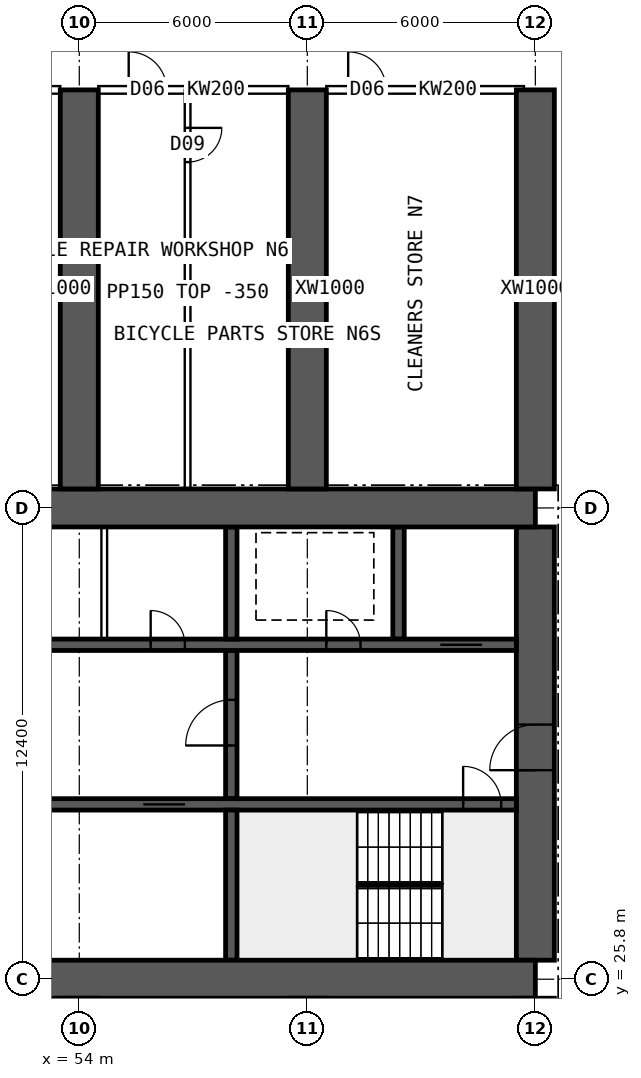
"""IFC4 building model, lengths in metres.
Left out: names, types, materials, properties, quantities, classifications, styles, units other than length and angle.
Written with IfcOpenShell. Run it as: python <this file> out.ifc"""

import sys

from ifc_helpers import new_model, si_unit, direction, frame, frame_2d, origin, place, context, subcontext, project, spatial, rectangle, extrude, element, fill, save


model = new_model("IFC4")
c1 = context("Model", 3, precision=1e-05, world=origin(), true_north=direction((0.0, 1.0)))
c2 = subcontext(c1, "Body", "Model", "MODEL_VIEW")
j1 = project(units=[si_unit("LENGTHUNIT", "METRE"), si_unit("PLANEANGLEUNIT", "RADIAN")], contexts=[c1])
p1 = place(None, origin())
s1 = spatial("IfcSite", under=j1, at=p1, CompositionType="ELEMENT")
p2 = place(p1, origin())
s2 = spatial("IfcBuilding", under=s1, at=p2, CompositionType="ELEMENT")
p3 = place(p2, origin())
s3 = spatial("IfcBuildingStorey", under=s2, at=p3, CompositionType="ELEMENT", Elevation=0.0)
for number, where, z_axis, x_axis in (
    (1, (18.0, 25.8, 0.0), (0.0, 0.0, 1.0), (1.0, 0.0, 0.0)),
    (2, (18.0, 38.2, 0.0), (0.0, 0.0, 1.0), (1.0, 0.0, 0.0)),
):
    element("IfcWall", number, at=place(p3, frame(where, z_axis=z_axis, x_axis=x_axis)), inside=s3, PredefinedType="SHEAR", context=c2, shape_type="SweptSolid", body=[
        extrude(rectangle(XDim=48.0, YDim=1.0, at=frame_2d((24.0, 0.0))), origin(), (0.0, 0.0, 1.0), 6.0),
    ])
p4 = place(p3, frame((66.0, 26.3, 0.0), z_axis=(0.0, 0.0, 1.0), x_axis=(0.0, 1.0, 0.0)))
e3 = element("IfcWall", 3, at=p4, inside=s3, PredefinedType="SHEAR", context=c2, shape_type="SweptSolid", body=[
    extrude(rectangle(XDim=11.4, YDim=1.0, at=frame_2d((5.7, 0.0))), origin(), (0.0, 0.0, 1.0), 6.0),
])
p5 = place(p4, frame((5.0, 0.0, 0.0)))
e4 = element("IfcOpeningElement", 4, at=p5, cuts=e3, PredefinedType="OPENING", context=c2, shape_type="SweptSolid", body=[
    extrude(rectangle(XDim=1.2, YDim=2.1, at=frame_2d((0.6, 1.05))), frame((0.0, 0.51, 0.0), z_axis=(0.0, -1.0, 0.0), x_axis=(1.0, 0.0, 0.0)), (0.0, 0.0, 1.0), 1.02),
])
p6 = place(p3, frame((18.5, 30.4, 0.0), z_axis=(0.0, 0.0, 1.0), x_axis=(1.0, 0.0, 0.0)))
e5 = element("IfcWall", 5, at=p6, inside=s3, PredefinedType="SHEAR", context=c2, shape_type="SweptSolid", body=[
    extrude(rectangle(XDim=47.0, YDim=0.3, at=frame_2d((23.5, 0.0))), origin(), (0.0, 0.0, 1.0), 6.0),
])
p7 = place(p6, frame((0.4, 0.0, 0.0)))
e6 = element("IfcOpeningElement", 6, at=p7, cuts=e5, PredefinedType="OPENING", context=c2, shape_type="SweptSolid", body=[
    extrude(rectangle(XDim=1.0, YDim=2.1, at=frame_2d((0.5, 1.05))), frame((0.0, 0.16, 0.0), z_axis=(0.0, -1.0, 0.0), x_axis=(1.0, 0.0, 0.0)), (0.0, 0.0, 1.0), 0.32),
])
p8 = place(p6, frame((45.6, 0.0, 0.0)))
e7 = element("IfcOpeningElement", 7, at=p8, cuts=e5, PredefinedType="OPENING", context=c2, shape_type="SweptSolid", body=[
    extrude(rectangle(XDim=1.0, YDim=2.1, at=frame_2d((0.5, 1.05))), frame((0.0, 0.16, 0.0), z_axis=(0.0, -1.0, 0.0), x_axis=(1.0, 0.0, 0.0)), (0.0, 0.0, 1.0), 0.32),
])
p9 = place(p6, frame((8.25, 0.0, 0.0)))
e8 = element("IfcOpeningElement", 8, at=p9, cuts=e5, PredefinedType="OPENING", context=c2, shape_type="SweptSolid", body=[
    extrude(rectangle(XDim=1.1, YDim=2.1, at=frame_2d((0.55, 1.05))), frame((0.0, 0.16, 0.0), z_axis=(0.0, -1.0, 0.0), x_axis=(1.0, 0.0, 0.0)), (0.0, 0.0, 1.0), 0.32),
])
p10 = place(p6, frame((10.85, 0.0, 0.0)))
e9 = element("IfcOpeningElement", 9, at=p10, cuts=e5, PredefinedType="OPENING", context=c2, shape_type="SweptSolid", body=[
    extrude(rectangle(XDim=1.1, YDim=2.1, at=frame_2d((0.55, 1.05))), frame((0.0, 0.16, 0.0), z_axis=(0.0, -1.0, 0.0), x_axis=(1.0, 0.0, 0.0)), (0.0, 0.0, 1.0), 0.32),
])
p11 = place(p6, frame((13.45, 0.0, 0.0)))
e10 = element("IfcOpeningElement", 10, at=p11, cuts=e5, PredefinedType="OPENING", context=c2, shape_type="SweptSolid", body=[
    extrude(rectangle(XDim=1.1, YDim=2.1, at=frame_2d((0.55, 1.05))), frame((0.0, 0.16, 0.0), z_axis=(0.0, -1.0, 0.0), x_axis=(1.0, 0.0, 0.0)), (0.0, 0.0, 1.0), 0.32),
])
p12 = place(p6, frame((16.05, 0.0, 0.0)))
e11 = element("IfcOpeningElement", 11, at=p12, cuts=e5, PredefinedType="OPENING", context=c2, shape_type="SweptSolid", body=[
    extrude(rectangle(XDim=1.1, YDim=2.1, at=frame_2d((0.55, 1.05))), frame((0.0, 0.16, 0.0), z_axis=(0.0, -1.0, 0.0), x_axis=(1.0, 0.0, 0.0)), (0.0, 0.0, 1.0), 0.32),
])
p13 = place(p6, frame((18.725, 0.0, 0.0)))
e12 = element("IfcOpeningElement", 12, at=p13, cuts=e5, PredefinedType="OPENING", context=c2, shape_type="SweptSolid", body=[
    extrude(rectangle(XDim=1.1, YDim=2.1, at=frame_2d((0.55, 1.05))), frame((0.0, 0.16, 0.0), z_axis=(0.0, -1.0, 0.0), x_axis=(1.0, 0.0, 0.0)), (0.0, 0.0, 1.0), 0.32),
])
p14 = place(p6, frame((21.475, 0.0, 0.0)))
e13 = element("IfcOpeningElement", 13, at=p14, cuts=e5, PredefinedType="OPENING", context=c2, shape_type="SweptSolid", body=[
    extrude(rectangle(XDim=1.1, YDim=2.1, at=frame_2d((0.55, 1.05))), frame((0.0, 0.16, 0.0), z_axis=(0.0, -1.0, 0.0), x_axis=(1.0, 0.0, 0.0)), (0.0, 0.0, 1.0), 0.32),
])
p15 = place(p6, frame((24.225, 0.0, 0.0)))
e14 = element("IfcOpeningElement", 14, at=p15, cuts=e5, PredefinedType="OPENING", context=c2, shape_type="SweptSolid", body=[
    extrude(rectangle(XDim=1.1, YDim=2.1, at=frame_2d((0.55, 1.05))), frame((0.0, 0.16, 0.0), z_axis=(0.0, -1.0, 0.0), x_axis=(1.0, 0.0, 0.0)), (0.0, 0.0, 1.0), 0.32),
])
p16 = place(p6, frame((26.975, 0.0, 0.0)))
e15 = element("IfcOpeningElement", 15, at=p16, cuts=e5, PredefinedType="OPENING", context=c2, shape_type="SweptSolid", body=[
    extrude(rectangle(XDim=1.1, YDim=2.1, at=frame_2d((0.55, 1.05))), frame((0.0, 0.16, 0.0), z_axis=(0.0, -1.0, 0.0), x_axis=(1.0, 0.0, 0.0)), (0.0, 0.0, 1.0), 0.32),
])
p17 = place(p6, frame((30.117, 0.0, 0.0)))
e16 = element("IfcOpeningElement", 16, at=p17, cuts=e5, PredefinedType="OPENING", context=c2, shape_type="SweptSolid", body=[
    extrude(rectangle(XDim=1.1, YDim=2.1, at=frame_2d((0.55, 1.05))), frame((0.0, 0.16, 0.0), z_axis=(0.0, -1.0, 0.0), x_axis=(1.0, 0.0, 0.0)), (0.0, 0.0, 1.0), 0.32),
])
p18 = place(p6, frame((33.65, 0.0, 0.0)))
e17 = element("IfcOpeningElement", 17, at=p18, cuts=e5, PredefinedType="OPENING", context=c2, shape_type="SweptSolid", body=[
    extrude(rectangle(XDim=1.1, YDim=2.1, at=frame_2d((0.55, 1.05))), frame((0.0, 0.16, 0.0), z_axis=(0.0, -1.0, 0.0), x_axis=(1.0, 0.0, 0.0)), (0.0, 0.0, 1.0), 0.32),
])
p19 = place(p6, frame((37.183, 0.0, 0.0)))
e18 = element("IfcOpeningElement", 18, at=p19, cuts=e5, PredefinedType="OPENING", context=c2, shape_type="SweptSolid", body=[
    extrude(rectangle(XDim=1.1, YDim=2.1, at=frame_2d((0.55, 1.05))), frame((0.0, 0.16, 0.0), z_axis=(0.0, -1.0, 0.0), x_axis=(1.0, 0.0, 0.0)), (0.0, 0.0, 1.0), 0.32),
])
p20 = place(p3, frame((18.5, 34.6, 0.0), z_axis=(0.0, 0.0, 1.0), x_axis=(1.0, 0.0, 0.0)))
e19 = element("IfcWall", 19, at=p20, inside=s3, PredefinedType="SHEAR", context=c2, shape_type="SweptSolid", body=[
    extrude(rectangle(XDim=47.0, YDim=0.3, at=frame_2d((23.5, 0.0))), origin(), (0.0, 0.0, 1.0), 6.0),
])
p21 = place(p20, frame((0.9, 0.0, 0.0)))
e20 = element("IfcOpeningElement", 20, at=p21, cuts=e19, PredefinedType="OPENING", context=c2, shape_type="SweptSolid", body=[
    extrude(rectangle(XDim=1.1, YDim=2.1, at=frame_2d((0.55, 1.05))), frame((0.0, 0.16, 0.0), z_axis=(0.0, -1.0, 0.0), x_axis=(1.0, 0.0, 0.0)), (0.0, 0.0, 1.0), 0.32),
])
p22 = place(p20, frame((45.0, 0.0, 0.0)))
e21 = element("IfcOpeningElement", 21, at=p22, cuts=e19, PredefinedType="OPENING", context=c2, shape_type="SweptSolid", body=[
    extrude(rectangle(XDim=1.1, YDim=2.1, at=frame_2d((0.55, 1.05))), frame((0.0, 0.16, 0.0), z_axis=(0.0, -1.0, 0.0), x_axis=(1.0, 0.0, 0.0)), (0.0, 0.0, 1.0), 0.32),
])
p23 = place(p20, frame((4.1, 0.0, 0.0)))
e22 = element("IfcOpeningElement", 22, at=p23, cuts=e19, PredefinedType="OPENING", context=c2, shape_type="SweptSolid", body=[
    extrude(rectangle(XDim=0.9, YDim=2.1, at=frame_2d((0.45, 1.05))), frame((0.0, 0.16, 0.0), z_axis=(0.0, -1.0, 0.0), x_axis=(1.0, 0.0, 0.0)), (0.0, 0.0, 1.0), 0.32),
])
p24 = place(p20, frame((42.0, 0.0, 0.0)))
e23 = element("IfcOpeningElement", 23, at=p24, cuts=e19, PredefinedType="OPENING", context=c2, shape_type="SweptSolid", body=[
    extrude(rectangle(XDim=0.9, YDim=2.1, at=frame_2d((0.45, 1.05))), frame((0.0, 0.16, 0.0), z_axis=(0.0, -1.0, 0.0), x_axis=(1.0, 0.0, 0.0)), (0.0, 0.0, 1.0), 0.32),
])
p25 = place(p20, frame((8.875, 0.0, 0.0)))
e24 = element("IfcOpeningElement", 24, at=p25, cuts=e19, PredefinedType="OPENING", context=c2, shape_type="SweptSolid", body=[
    extrude(rectangle(XDim=0.9, YDim=2.1, at=frame_2d((0.45, 1.05))), frame((0.0, 0.16, 0.0), z_axis=(0.0, -1.0, 0.0), x_axis=(1.0, 0.0, 0.0)), (0.0, 0.0, 1.0), 0.32),
])
p26 = place(p20, frame((12.849, 0.0, 0.0)))
e25 = element("IfcOpeningElement", 25, at=p26, cuts=e19, PredefinedType="OPENING", context=c2, shape_type="SweptSolid", body=[
    extrude(rectangle(XDim=0.9, YDim=2.1, at=frame_2d((0.45, 1.05))), frame((0.0, 0.16, 0.0), z_axis=(0.0, -1.0, 0.0), x_axis=(1.0, 0.0, 0.0)), (0.0, 0.0, 1.0), 0.32),
])
p27 = place(p20, frame((16.496, 0.0, 0.0)))
e26 = element("IfcOpeningElement", 26, at=p27, cuts=e19, PredefinedType="OPENING", context=c2, shape_type="SweptSolid", body=[
    extrude(rectangle(XDim=0.9, YDim=2.1, at=frame_2d((0.45, 1.05))), frame((0.0, 0.16, 0.0), z_axis=(0.0, -1.0, 0.0), x_axis=(1.0, 0.0, 0.0)), (0.0, 0.0, 1.0), 0.32),
])
p28 = place(p20, frame((20.255, 0.0, 0.0)))
e27 = element("IfcOpeningElement", 27, at=p28, cuts=e19, PredefinedType="OPENING", context=c2, shape_type="SweptSolid", body=[
    extrude(rectangle(XDim=0.9, YDim=2.1, at=frame_2d((0.45, 1.05))), frame((0.0, 0.16, 0.0), z_axis=(0.0, -1.0, 0.0), x_axis=(1.0, 0.0, 0.0)), (0.0, 0.0, 1.0), 0.32),
])
p29 = place(p20, frame((24.661, 0.0, 0.0)))
e28 = element("IfcOpeningElement", 28, at=p29, cuts=e19, PredefinedType="OPENING", context=c2, shape_type="SweptSolid", body=[
    extrude(rectangle(XDim=0.9, YDim=2.1, at=frame_2d((0.45, 1.05))), frame((0.0, 0.16, 0.0), z_axis=(0.0, -1.0, 0.0), x_axis=(1.0, 0.0, 0.0)), (0.0, 0.0, 1.0), 0.32),
])
p30 = place(p20, frame((27.458, 0.0, 0.0)))
e29 = element("IfcOpeningElement", 29, at=p30, cuts=e19, PredefinedType="OPENING", context=c2, shape_type="SweptSolid", body=[
    extrude(rectangle(XDim=0.9, YDim=2.1, at=frame_2d((0.45, 1.05))), frame((0.0, 0.16, 0.0), z_axis=(0.0, -1.0, 0.0), x_axis=(1.0, 0.0, 0.0)), (0.0, 0.0, 1.0), 0.32),
])
p31 = place(p20, frame((29.628, 0.0, 0.0)))
e30 = element("IfcOpeningElement", 30, at=p31, cuts=e19, PredefinedType="OPENING", context=c2, shape_type="SweptSolid", body=[
    extrude(rectangle(XDim=0.9, YDim=2.1, at=frame_2d((0.45, 1.05))), frame((0.0, 0.16, 0.0), z_axis=(0.0, -1.0, 0.0), x_axis=(1.0, 0.0, 0.0)), (0.0, 0.0, 1.0), 0.32),
])
p32 = place(p20, frame((33.427, 0.0, 0.0)))
e31 = element("IfcOpeningElement", 31, at=p32, cuts=e19, PredefinedType="OPENING", context=c2, shape_type="SweptSolid", body=[
    extrude(rectangle(XDim=0.9, YDim=2.1, at=frame_2d((0.45, 1.05))), frame((0.0, 0.16, 0.0), z_axis=(0.0, -1.0, 0.0), x_axis=(1.0, 0.0, 0.0)), (0.0, 0.0, 1.0), 0.32),
])
p33 = place(p20, frame((37.378, 0.0, 0.0)))
e32 = element("IfcOpeningElement", 32, at=p33, cuts=e19, PredefinedType="OPENING", context=c2, shape_type="SweptSolid", body=[
    extrude(rectangle(XDim=0.9, YDim=2.1, at=frame_2d((0.45, 1.05))), frame((0.0, 0.16, 0.0), z_axis=(0.0, -1.0, 0.0), x_axis=(1.0, 0.0, 0.0)), (0.0, 0.0, 1.0), 0.32),
])
p34 = place(p3, frame((58.0, 26.3, 0.0), z_axis=(0.0, 0.0, 1.0), x_axis=(0.0, 1.0, 0.0)))
e33 = element("IfcWall", 33, at=p34, inside=s3, PredefinedType="SHEAR", context=c2, shape_type="SweptSolid", body=[
    extrude(rectangle(XDim=3.95, YDim=0.3, at=frame_2d((1.975, 0.0))), origin(), (0.0, 0.0, 1.0), 6.0),
])
p35 = place(p3, frame((58.0, 30.55, 0.0), z_axis=(0.0, 0.0, 1.0), x_axis=(0.0, 1.0, 0.0)))
e34 = element("IfcWall", 34, at=p35, inside=s3, PredefinedType="SHEAR", context=c2, shape_type="SweptSolid", body=[
    extrude(rectangle(XDim=3.9, YDim=0.3, at=frame_2d((1.95, 0.0))), origin(), (0.0, 0.0, 1.0), 6.0),
])
p36 = place(p35, frame((1.4, 0.0, 0.0)))
e35 = element("IfcOpeningElement", 35, at=p36, cuts=e34, PredefinedType="OPENING", context=c2, shape_type="SweptSolid", body=[
    extrude(rectangle(XDim=1.2, YDim=2.1, at=frame_2d((0.6, 1.05))), frame((0.0, 0.16, 0.0), z_axis=(0.0, -1.0, 0.0), x_axis=(1.0, 0.0, 0.0)), (0.0, 0.0, 1.0), 0.32),
])
for number, where, z_axis, x_axis in (
    (36, (62.4, 34.75, 0.0), (0.0, 0.0, 1.0), (0.0, 1.0, 0.0)),
    (37, (58.0, 34.75, 0.0), (0.0, 0.0, 1.0), (0.0, 1.0, 0.0)),
):
    element("IfcWall", number, at=place(p3, frame(where, z_axis=z_axis, x_axis=x_axis)), inside=s3, PredefinedType="SHEAR", context=c2, shape_type="SweptSolid", body=[
        extrude(rectangle(XDim=2.95, YDim=0.3, at=frame_2d((1.475, 0.0))), origin(), (0.0, 0.0, 1.0), 6.0),
    ])
for number, where, z_axis, x_axis in (
    (38, (54.0, 38.7, 0.0), (0.0, 0.0, 1.0), (0.0, 1.0, 0.0)),
    (39, (60.0, 38.7, 0.0), (0.0, 0.0, 1.0), (0.0, 1.0, 0.0)),
    (40, (66.0, 38.7, 0.0), (0.0, 0.0, 1.0), (0.0, 1.0, 0.0)),
):
    element("IfcWall", number, at=place(p3, frame(where, z_axis=z_axis, x_axis=x_axis)), inside=s3, PredefinedType="SHEAR", context=c2, shape_type="SweptSolid", body=[
        extrude(rectangle(XDim=10.5, YDim=1.0, at=frame_2d((5.25, 0.0))), origin(), (0.0, 0.0, 1.0), 6.0),
    ])
p37 = place(p3, frame((54.657, 34.75, 0.0), z_axis=(0.0, 0.0, 1.0), x_axis=(0.0, 1.0, 0.0)))
e41 = element("IfcWall", 41, at=p37, inside=s3, PredefinedType="SOLIDWALL", context=c2, shape_type="SweptSolid", body=[
    extrude(rectangle(XDim=2.95, YDim=0.15, at=frame_2d((1.475, 0.0))), origin(), (0.0, 0.0, 1.0), 5.65),
])
p38 = place(p3, frame((55.95, 14.8, 0.0), z_axis=(0.0, 0.0, 1.0), x_axis=(0.0, 1.0, 0.0)))
e42 = element("IfcWall", 42, at=p38, inside=s3, PredefinedType="PARTITIONING", context=c2, shape_type="SweptSolid", body=[
    extrude(rectangle(XDim=10.7, YDim=0.15, at=frame_2d((5.35, 0.0))), origin(), (0.0, 0.0, 1.0), 5.65),
])
p39 = place(p38, frame((1.0, 0.0, 0.0)))
e43 = element("IfcOpeningElement", 43, at=p39, cuts=e42, PredefinedType="OPENING", context=c2, shape_type="SweptSolid", body=[
    extrude(rectangle(XDim=0.9, YDim=2.1, at=frame_2d((0.45, 1.05))), frame((0.0, 0.085, 0.0), z_axis=(0.0, -1.0, 0.0), x_axis=(1.0, 0.0, 0.0)), (0.0, 0.0, 1.0), 0.17),
])
p40 = place(p3, frame((56.85, 38.5, 0.0), z_axis=(0.0, 0.0, 1.0), x_axis=(0.0, 1.0, 0.0)))
e44 = element("IfcWall", 44, at=p40, inside=s3, PredefinedType="PARTITIONING", context=c2, shape_type="SweptSolid", body=[
    extrude(rectangle(XDim=10.7, YDim=0.15, at=frame_2d((5.35, 0.0))), origin(), (0.0, 0.0, 1.0), 5.65),
])
p41 = place(p40, frame((8.8, 0.0, 0.0)))
e45 = element("IfcOpeningElement", 45, at=p41, cuts=e44, PredefinedType="OPENING", context=c2, shape_type="SweptSolid", body=[
    extrude(rectangle(XDim=0.9, YDim=2.1, at=frame_2d((0.45, 1.05))), frame((0.0, 0.085, 0.0), z_axis=(0.0, -1.0, 0.0), x_axis=(1.0, 0.0, 0.0)), (0.0, 0.0, 1.0), 0.17),
])
p42 = place(p3, frame((48.5, 49.2, 0.0), z_axis=(0.0, 0.0, 1.0), x_axis=(1.0, 0.0, 0.0)))
e46 = element("IfcWall", 46, at=p42, inside=s3, PredefinedType="SOLIDWALL", context=c2, shape_type="SweptSolid", body=[
    extrude(rectangle(XDim=5.0, YDim=0.2, at=frame_2d((2.5, 0.0))), origin(), (0.0, 0.0, 1.0), 5.65),
])
p43 = place(p42, frame((0.575, 0.0, 0.0)))
e47 = element("IfcOpeningElement", 47, at=p43, cuts=e46, PredefinedType="OPENING", context=c2, shape_type="SweptSolid", body=[
    extrude(rectangle(XDim=1.0, YDim=2.1, at=frame_2d((0.5, 1.05))), frame((0.0, 0.11, 0.0), z_axis=(0.0, -1.0, 0.0), x_axis=(1.0, 0.0, 0.0)), (0.0, 0.0, 1.0), 0.22),
])
p44 = place(p3, frame((54.5, 49.2, 0.0), z_axis=(0.0, 0.0, 1.0), x_axis=(1.0, 0.0, 0.0)))
e48 = element("IfcWall", 48, at=p44, inside=s3, PredefinedType="SOLIDWALL", context=c2, shape_type="SweptSolid", body=[
    extrude(rectangle(XDim=5.0, YDim=0.2, at=frame_2d((2.5, 0.0))), origin(), (0.0, 0.0, 1.0), 5.65),
])
p45 = place(p44, frame((0.8, 0.0, 0.0)))
e49 = element("IfcOpeningElement", 49, at=p45, cuts=e48, PredefinedType="OPENING", context=c2, shape_type="SweptSolid", body=[
    extrude(rectangle(XDim=1.0, YDim=2.1, at=frame_2d((0.5, 1.05))), frame((0.0, 0.11, 0.0), z_axis=(0.0, -1.0, 0.0), x_axis=(1.0, 0.0, 0.0)), (0.0, 0.0, 1.0), 0.22),
])
p46 = place(p3, frame((60.5, 49.2, 0.0), z_axis=(0.0, 0.0, 1.0), x_axis=(1.0, 0.0, 0.0)))
e50 = element("IfcWall", 50, at=p46, inside=s3, PredefinedType="SOLIDWALL", context=c2, shape_type="SweptSolid", body=[
    extrude(rectangle(XDim=5.2, YDim=0.2, at=frame_2d((2.6, 0.0))), origin(), (0.0, 0.0, 1.0), 5.65),
])
p47 = place(p46, frame((0.575, 0.0, 0.0)))
e51 = element("IfcOpeningElement", 51, at=p47, cuts=e50, PredefinedType="OPENING", context=c2, shape_type="SweptSolid", body=[
    extrude(rectangle(XDim=1.0, YDim=2.1, at=frame_2d((0.5, 1.05))), frame((0.0, 0.11, 0.0), z_axis=(0.0, -1.0, 0.0), x_axis=(1.0, 0.0, 0.0)), (0.0, 0.0, 1.0), 0.22),
])
p48 = place(p5, origin())
e52 = element("IfcDoor", 52, at=p48, inside=s3, OperationType="SINGLE_SWING_LEFT", PredefinedType="DOOR", context=c2, shape_type="SweptSolid", body=[
    extrude(rectangle(XDim=1.2, YDim=2.1, at=frame_2d((0.6, 1.05))), frame((0.0, 0.025, 0.0), z_axis=(0.0, -1.0, 0.0), x_axis=(1.0, 0.0, 0.0)), (0.0, 0.0, 1.0), 0.05),
])
fill(e4, e52)
p49 = place(p8, origin())
e53 = element("IfcDoor", 53, at=p49, inside=s3, OperationType="SINGLE_SWING_LEFT", PredefinedType="DOOR", context=c2, shape_type="SweptSolid", body=[
    extrude(rectangle(XDim=1.0, YDim=2.1, at=frame_2d((0.5, 1.05))), frame((0.0, 0.025, 0.0), z_axis=(0.0, -1.0, 0.0), x_axis=(1.0, 0.0, 0.0)), (0.0, 0.0, 1.0), 0.05),
])
fill(e7, e53)
p50 = place(p22, origin())
e54 = element("IfcDoor", 54, at=p50, inside=s3, OperationType="DOUBLE_DOOR_SLIDING", PredefinedType="DOOR", context=c2, shape_type="SweptSolid", body=[
    extrude(rectangle(XDim=1.1, YDim=2.1, at=frame_2d((0.55, 1.05))), frame((0.0, 0.025, 0.0), z_axis=(0.0, -1.0, 0.0), x_axis=(1.0, 0.0, 0.0)), (0.0, 0.0, 1.0), 0.05),
])
fill(e21, e54)
p51 = place(p24, origin())
e55 = element("IfcDoor", 55, at=p51, inside=s3, OperationType="SINGLE_SWING_LEFT", PredefinedType="DOOR", context=c2, shape_type="SweptSolid", body=[
    extrude(rectangle(XDim=0.9, YDim=2.1, at=frame_2d((0.45, 1.05))), frame((0.0, 0.025, 0.0), z_axis=(0.0, -1.0, 0.0), x_axis=(1.0, 0.0, 0.0)), (0.0, 0.0, 1.0), 0.05),
])
fill(e23, e55)
p52 = place(p36, origin())
e56 = element("IfcDoor", 56, at=p52, inside=s3, OperationType="SINGLE_SWING_LEFT", PredefinedType="DOOR", context=c2, shape_type="SweptSolid", body=[
    extrude(rectangle(XDim=1.2, YDim=2.1, at=frame_2d((0.6, 1.05))), frame((0.0, 0.025, 0.0), z_axis=(0.0, -1.0, 0.0), x_axis=(1.0, 0.0, 0.0)), (0.0, 0.0, 1.0), 0.05),
])
fill(e35, e56)
p53 = place(p33, origin())
e57 = element("IfcDoor", 57, at=p53, inside=s3, OperationType="SINGLE_SWING_LEFT", PredefinedType="DOOR", context=c2, shape_type="SweptSolid", body=[
    extrude(rectangle(XDim=0.9, YDim=2.1, at=frame_2d((0.45, 1.05))), frame((0.0, 0.025, 0.0), z_axis=(0.0, -1.0, 0.0), x_axis=(1.0, 0.0, 0.0)), (0.0, 0.0, 1.0), 0.05),
])
fill(e32, e57)
p54 = place(p19, origin())
e58 = element("IfcDoor", 58, at=p54, inside=s3, OperationType="DOUBLE_DOOR_SLIDING", PredefinedType="DOOR", context=c2, shape_type="SweptSolid", body=[
    extrude(rectangle(XDim=1.1, YDim=2.1, at=frame_2d((0.55, 1.05))), frame((0.0, 0.025, 0.0), z_axis=(0.0, -1.0, 0.0), x_axis=(1.0, 0.0, 0.0)), (0.0, 0.0, 1.0), 0.05),
])
fill(e18, e58)
p55 = place(p41, origin())
e59 = element("IfcDoor", 59, at=p55, inside=s3, OperationType="SINGLE_SWING_RIGHT", PredefinedType="DOOR", context=c2, shape_type="SweptSolid", body=[
    extrude(rectangle(XDim=0.9, YDim=2.1, at=frame_2d((0.45, 1.05))), frame((0.0, 0.025, 0.0), z_axis=(0.0, -1.0, 0.0), x_axis=(1.0, 0.0, 0.0)), (0.0, 0.0, 1.0), 0.05),
])
fill(e45, e59)
p56 = place(p45, origin())
e60 = element("IfcDoor", 60, at=p56, inside=s3, OperationType="SINGLE_SWING_LEFT", PredefinedType="DOOR", context=c2, shape_type="SweptSolid", body=[
    extrude(rectangle(XDim=1.0, YDim=2.1, at=frame_2d((0.5, 1.05))), frame((0.0, 0.025, 0.0), z_axis=(0.0, -1.0, 0.0), x_axis=(1.0, 0.0, 0.0)), (0.0, 0.0, 1.0), 0.05),
])
fill(e49, e60)
p57 = place(p47, origin())
e61 = element("IfcDoor", 61, at=p57, inside=s3, OperationType="SINGLE_SWING_LEFT", PredefinedType="DOOR", context=c2, shape_type="SweptSolid", body=[
    extrude(rectangle(XDim=1.0, YDim=2.1, at=frame_2d((0.5, 1.05))), frame((0.0, 0.025, 0.0), z_axis=(0.0, -1.0, 0.0), x_axis=(1.0, 0.0, 0.0)), (0.0, 0.0, 1.0), 0.05),
])
fill(e51, e61)
save(model, sys.argv[1])
